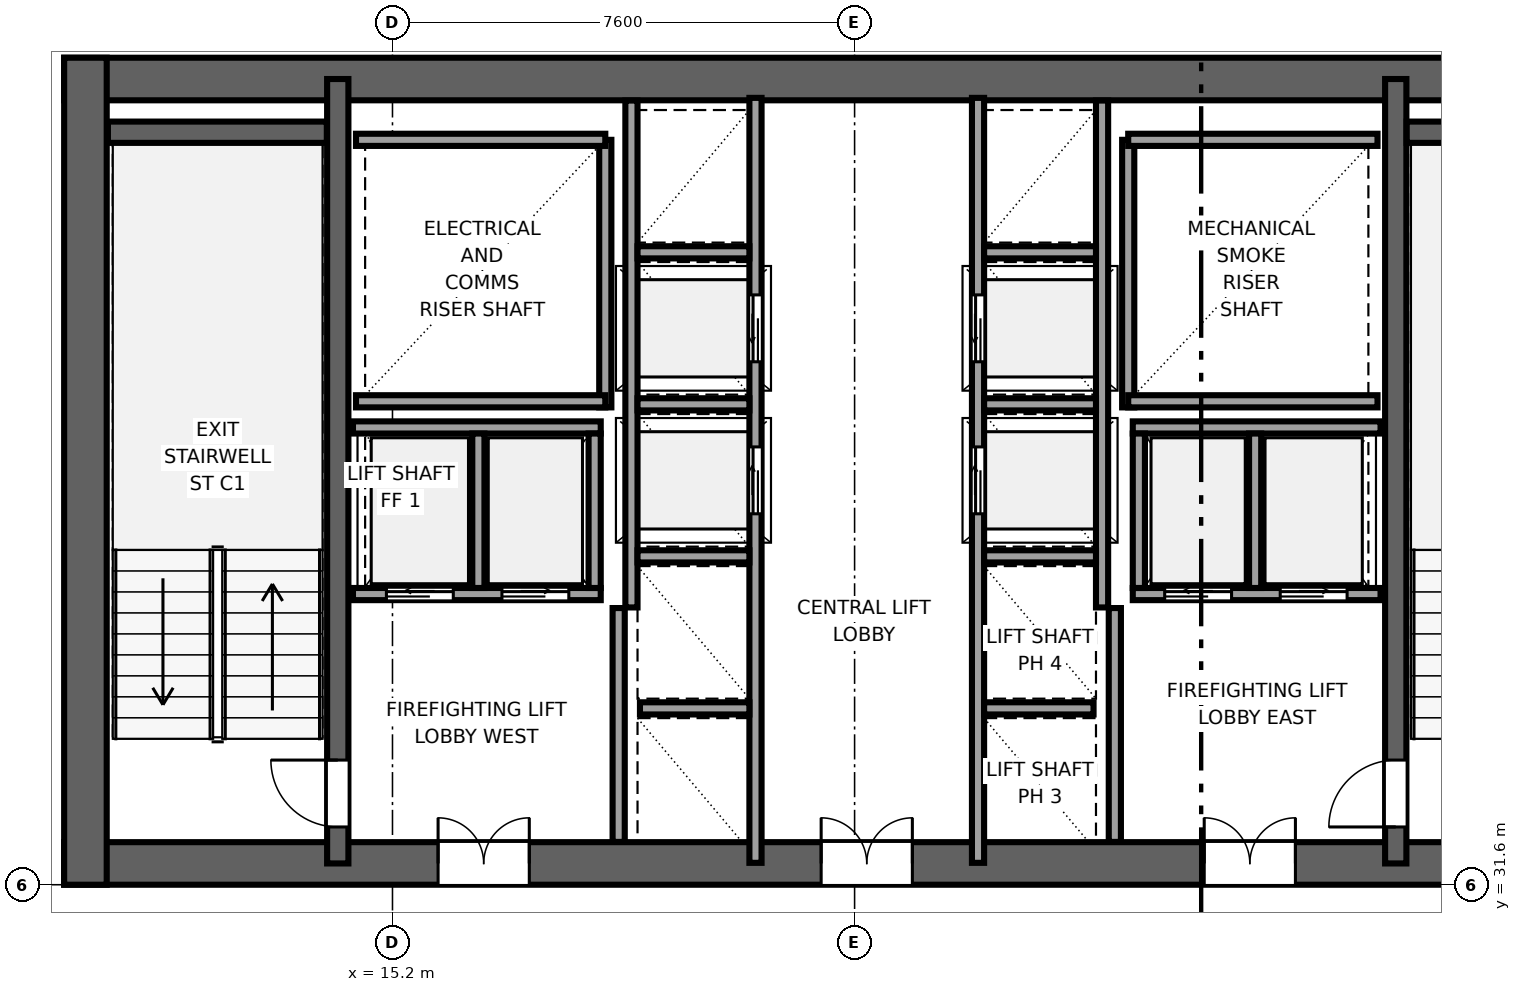
"""IFC4 building model, lengths in metres.
Left out: names, types, materials, properties, quantities, classifications, styles, units other than length and angle.
Written with IfcOpenShell. Run it as: python <this file> out.ifc"""

import sys

from ifc_helpers import new_model, si_unit, direction, frame, frame_2d, origin, place, context, subcontext, project, spatial, rectangle, extrude, source, transform, mapped, element, fill, save


model = new_model("IFC4")
c1 = context("Model", 3, precision=1e-05, world=origin(), true_north=direction((0.0, 1.0)))
c2 = subcontext(c1, "Body", "Model", "MODEL_VIEW")
j1 = project(units=[si_unit("LENGTHUNIT", "METRE"), si_unit("PLANEANGLEUNIT", "RADIAN")], contexts=[c1])
p1 = place(None, origin())
s1 = spatial("IfcSite", under=j1, at=p1, CompositionType="ELEMENT")
p2 = place(p1, origin())
s2 = spatial("IfcBuilding", under=s1, at=p2, CompositionType="ELEMENT")
p3 = place(p2, frame((0.0, 0.0, 129.3)))
s3 = spatial("IfcBuildingStorey", under=s2, at=p3, CompositionType="ELEMENT", Elevation=129.3)
p4 = place(p3, frame((9.8, 31.95, 0.0), z_axis=(0.0, 0.0, 1.0), x_axis=(1.0, 0.0, 0.0)))
e1 = element("IfcWall", 1, at=p4, inside=s3, PredefinedType="SHEAR", context=c2, shape_type="SweptSolid", body=[
    extrude(rectangle(XDim=26.4, YDim=0.7, at=frame_2d((13.2, 0.0))), origin(), (0.0, 0.0, 1.0), 3.55),
])
p5 = place(p4, frame((7.65, 0.0, 0.0), z_axis=(0.0, 0.0, 1.0), x_axis=(-1.0, 0.0, 0.0)))
e2 = element("IfcOpeningElement", 2, at=p5, cuts=e1, PredefinedType="OPENING", context=c2, shape_type="SweptSolid", body=[
    extrude(rectangle(XDim=1.5, YDim=2.04, at=frame_2d((0.75, 1.02))), frame((0.0, 0.36, 0.0), z_axis=(0.0, -1.0, 0.0), x_axis=(1.0, 0.0, 0.0)), (0.0, 0.0, 1.0), 0.72),
])
p6 = place(p4, frame((13.95, 0.0, 0.0), z_axis=(0.0, 0.0, 1.0), x_axis=(-1.0, 0.0, 0.0)))
e3 = element("IfcOpeningElement", 3, at=p6, cuts=e1, PredefinedType="OPENING", context=c2, shape_type="SweptSolid", body=[
    extrude(rectangle(XDim=1.5, YDim=2.04, at=frame_2d((0.75, 1.02))), frame((0.0, 0.36, 0.0), z_axis=(0.0, -1.0, 0.0), x_axis=(1.0, 0.0, 0.0)), (0.0, 0.0, 1.0), 0.72),
])
p7 = place(p4, frame((20.25, 0.0, 0.0), z_axis=(0.0, 0.0, 1.0), x_axis=(-1.0, 0.0, 0.0)))
e4 = element("IfcOpeningElement", 4, at=p7, cuts=e1, PredefinedType="OPENING", context=c2, shape_type="SweptSolid", body=[
    extrude(rectangle(XDim=1.5, YDim=2.04, at=frame_2d((0.75, 1.02))), frame((0.0, 0.36, 0.0), z_axis=(0.0, -1.0, 0.0), x_axis=(1.0, 0.0, 0.0)), (0.0, 0.0, 1.0), 0.72),
])
p8 = place(p3, frame((9.8, 44.85, 0.0), z_axis=(0.0, 0.0, 1.0), x_axis=(1.0, 0.0, 0.0)))
e5 = element("IfcWall", 5, at=p8, inside=s3, PredefinedType="SHEAR", context=c2, shape_type="SweptSolid", body=[
    extrude(rectangle(XDim=26.4, YDim=0.7, at=frame_2d((13.2, 0.0))), origin(), (0.0, 0.0, 1.0), 3.55),
])
p9 = place(p3, frame((10.15, 31.6, 0.0), z_axis=(0.0, 0.0, 1.0), x_axis=(0.0, 1.0, 0.0)))
e6 = element("IfcWall", 6, at=p9, inside=s3, PredefinedType="SHEAR", context=c2, shape_type="SweptSolid", body=[
    extrude(rectangle(XDim=13.6, YDim=0.7, at=frame_2d((6.8, 0.0))), origin(), (0.0, 0.0, 1.0), 3.55),
])
p10 = place(p3, frame((14.3, 31.95, 0.0), z_axis=(0.0, 0.0, 1.0), x_axis=(0.0, 1.0, 0.0)))
e7 = element("IfcWall", 7, at=p10, inside=s3, PredefinedType="SHEAR", context=c2, shape_type="SweptSolid", body=[
    extrude(rectangle(XDim=12.9, YDim=0.35, at=frame_2d((6.45, 0.0))), origin(), (0.0, 0.0, 1.0), 3.55),
])
p11 = place(p10, frame((0.6, 0.0, 0.0)))
e8 = element("IfcOpeningElement", 8, at=p11, cuts=e7, PredefinedType="OPENING", context=c2, shape_type="SweptSolid", body=[
    extrude(rectangle(XDim=1.1, YDim=2.12, at=frame_2d((0.55, 1.06))), frame((0.0, 0.185, 0.0), z_axis=(0.0, -1.0, 0.0), x_axis=(1.0, 0.0, 0.0)), (0.0, 0.0, 1.0), 0.37),
])
p12 = place(p3, frame((31.7, 31.95, 0.0), z_axis=(0.0, 0.0, 1.0), x_axis=(0.0, 1.0, 0.0)))
e9 = element("IfcWall", 9, at=p12, inside=s3, PredefinedType="SHEAR", context=c2, shape_type="SweptSolid", body=[
    extrude(rectangle(XDim=12.9, YDim=0.35, at=frame_2d((6.45, 0.0))), origin(), (0.0, 0.0, 1.0), 3.55),
])
p13 = place(p12, frame((1.7, 0.0, 0.0), z_axis=(0.0, 0.0, 1.0), x_axis=(-1.0, 0.0, 0.0)))
e10 = element("IfcOpeningElement", 10, at=p13, cuts=e9, PredefinedType="OPENING", context=c2, shape_type="SweptSolid", body=[
    extrude(rectangle(XDim=1.1, YDim=2.12, at=frame_2d((0.55, 1.06))), frame((0.0, 0.185, 0.0), z_axis=(0.0, -1.0, 0.0), x_axis=(1.0, 0.0, 0.0)), (0.0, 0.0, 1.0), 0.37),
])
for number, where, z_axis, x_axis in (
    (11, (10.52, 43.975, 0.0), (0.0, 0.0, 1.0), (1.0, 0.0, 0.0)),
    (12, (31.88, 43.975, 0.0), (0.0, 0.0, 1.0), (1.0, 0.0, 0.0)),
):
    element("IfcWall", number, at=place(p3, frame(where, z_axis=z_axis, x_axis=x_axis)), inside=s3, PredefinedType="SHEAR", context=c2, shape_type="SweptSolid", body=[
        extrude(rectangle(XDim=3.6, YDim=0.35, at=frame_2d((1.8, 0.0))), origin(), (0.0, 0.0, 1.0), 3.55),
    ])
p14 = place(p3, frame((18.7, 39.45, 0.0), z_axis=(0.0, 0.0, 1.0), x_axis=(0.0, 1.0, 0.0)))
e13 = element("IfcWall", 13, at=p14, inside=s3, PredefinedType="SOLIDWALL", context=c2, shape_type="SweptSolid", body=[
    extrude(rectangle(XDim=4.4, YDim=0.2, at=frame_2d((2.2, 0.0))), origin(), (0.0, 0.0, 1.0), 3.37),
])
for number, where, z_axis, x_axis in (
    (14, (14.6, 39.55, 0.0), (0.0, 0.0, 1.0), (1.0, 0.0, 0.0)),
    (15, (14.6, 43.85, 0.0), (0.0, 0.0, 1.0), (1.0, 0.0, 0.0)),
):
    element("IfcWall", number, at=place(p3, frame(where, z_axis=z_axis, x_axis=x_axis)), inside=s3, PredefinedType="SOLIDWALL", context=c2, shape_type="SweptSolid", body=[
        extrude(rectangle(XDim=4.1, YDim=0.2, at=frame_2d((2.05, 0.0))), origin(), (0.0, 0.0, 1.0), 3.37),
    ])
p15 = place(p3, frame((27.3, 39.45, 0.0), z_axis=(0.0, 0.0, 1.0), x_axis=(0.0, 1.0, 0.0)))
e16 = element("IfcWall", 16, at=p15, inside=s3, PredefinedType="SOLIDWALL", context=c2, shape_type="SweptSolid", body=[
    extrude(rectangle(XDim=4.4, YDim=0.2, at=frame_2d((2.2, 0.0))), origin(), (0.0, 0.0, 1.0), 3.37),
])
for number, where, z_axis, x_axis in (
    (17, (27.3, 39.55, 0.0), (0.0, 0.0, 1.0), (1.0, 0.0, 0.0)),
    (18, (27.3, 43.85, 0.0), (0.0, 0.0, 1.0), (1.0, 0.0, 0.0)),
):
    element("IfcWall", number, at=place(p3, frame(where, z_axis=z_axis, x_axis=x_axis)), inside=s3, PredefinedType="SOLIDWALL", context=c2, shape_type="SweptSolid", body=[
        extrude(rectangle(XDim=4.1, YDim=0.2, at=frame_2d((2.05, 0.0))), origin(), (0.0, 0.0, 1.0), 3.37),
    ])
for number, where, z_axis, x_axis in (
    (19, (18.92, 32.304, 0.0), (0.0, 0.0, 1.0), (0.0, 1.0, 0.0)),
    (20, (27.08, 32.304, 0.0), (0.0, 0.0, 1.0), (0.0, 1.0, 0.0)),
):
    element("IfcWall", number, at=place(p3, frame(where, z_axis=z_axis, x_axis=x_axis)), inside=s3, PredefinedType="SOLIDWALL", context=c2, shape_type="SweptSolid", body=[
        extrude(rectangle(XDim=3.846, YDim=0.2, at=frame_2d((1.923, 0.0))), origin(), (0.0, 0.0, 1.0), 3.37),
    ])
p16 = place(p3, frame((21.17, 31.96, 0.0), z_axis=(0.0, 0.0, 1.0), x_axis=(0.0, 1.0, 0.0)))
e21 = element("IfcWall", 21, at=p16, inside=s3, PredefinedType="SOLIDWALL", context=c2, shape_type="SweptSolid", body=[
    extrude(rectangle(XDim=12.58, YDim=0.2, at=frame_2d((6.29, 0.0))), origin(), (0.0, 0.0, 1.0), 3.37),
])
p17 = place(p16, frame((5.74, 0.0, 0.0)))
e22 = element("IfcOpeningElement", 22, at=p17, cuts=e21, PredefinedType="OPENING", context=c2, shape_type="SweptSolid", body=[
    extrude(rectangle(XDim=1.1, YDim=2.12, at=frame_2d((0.55, 1.06))), frame((0.0, 0.11, 0.0), z_axis=(0.0, -1.0, 0.0), x_axis=(1.0, 0.0, 0.0)), (0.0, 0.0, 1.0), 0.22),
])
p18 = place(p16, frame((8.24, 0.0, 0.0)))
e23 = element("IfcOpeningElement", 23, at=p18, cuts=e21, PredefinedType="OPENING", context=c2, shape_type="SweptSolid", body=[
    extrude(rectangle(XDim=1.1, YDim=2.12, at=frame_2d((0.55, 1.06))), frame((0.0, 0.11, 0.0), z_axis=(0.0, -1.0, 0.0), x_axis=(1.0, 0.0, 0.0)), (0.0, 0.0, 1.0), 0.22),
])
p19 = place(p3, frame((19.13, 36.16, 0.0), z_axis=(0.0, 0.0, 1.0), x_axis=(0.0, 1.0, 0.0)))
e24 = element("IfcWall", 24, at=p19, inside=s3, PredefinedType="SOLIDWALL", context=c2, shape_type="SweptSolid", body=[
    extrude(rectangle(XDim=8.336, YDim=0.2, at=frame_2d((4.168, 0.0))), origin(), (0.0, 0.0, 1.0), 3.37),
])
p20 = place(p3, frame((19.27, 34.5, 0.0), z_axis=(0.0, 0.0, 1.0), x_axis=(1.0, 0.0, 0.0)))
e25 = element("IfcWall", 25, at=p20, inside=s3, PredefinedType="SOLIDWALL", context=c2, shape_type="SweptSolid", body=[
    extrude(rectangle(XDim=1.8, YDim=0.2, at=frame_2d((0.9, 0.0))), origin(), (0.0, 0.0, 1.0), 3.37),
])
for number, where, z_axis, x_axis in (
    (26, (19.23, 37.0, 0.0), (0.0, 0.0, 1.0), (1.0, 0.0, 0.0)),
    (27, (19.23, 39.5, 0.0), (0.0, 0.0, 1.0), (1.0, 0.0, 0.0)),
    (28, (19.23, 42.0, 0.0), (0.0, 0.0, 1.0), (1.0, 0.0, 0.0)),
):
    element("IfcWall", number, at=place(p3, frame(where, z_axis=z_axis, x_axis=x_axis)), inside=s3, PredefinedType="SOLIDWALL", context=c2, shape_type="SweptSolid", body=[
        extrude(rectangle(XDim=1.84, YDim=0.2, at=frame_2d((0.92, 0.0))), origin(), (0.0, 0.0, 1.0), 3.37),
    ])
p21 = place(p3, frame((27.375, 36.38, 0.0), z_axis=(0.0, 0.0, 1.0), x_axis=(1.0, 0.0, 0.0)))
e29 = element("IfcWall", 29, at=p21, inside=s3, PredefinedType="SOLIDWALL", context=c2, shape_type="SweptSolid", body=[
    extrude(rectangle(XDim=4.075, YDim=0.2, at=frame_2d((2.038, 0.0))), origin(), (0.0, 0.0, 1.0), 3.37),
])
p22 = place(p21, frame((0.525, 0.0, 0.0)))
e30 = element("IfcOpeningElement", 30, at=p22, cuts=e29, PredefinedType="OPENING", context=c2, shape_type="SweptSolid", body=[
    extrude(rectangle(XDim=1.1, YDim=2.12, at=frame_2d((0.55, 1.06))), frame((0.0, 0.11, 0.0), z_axis=(0.0, -1.0, 0.0), x_axis=(1.0, 0.0, 0.0)), (0.0, 0.0, 1.0), 0.22),
])
p23 = place(p21, frame((2.425, 0.0, 0.0)))
e31 = element("IfcOpeningElement", 31, at=p23, cuts=e29, PredefinedType="OPENING", context=c2, shape_type="SweptSolid", body=[
    extrude(rectangle(XDim=1.1, YDim=2.12, at=frame_2d((0.55, 1.06))), frame((0.0, 0.11, 0.0), z_axis=(0.0, -1.0, 0.0), x_axis=(1.0, 0.0, 0.0)), (0.0, 0.0, 1.0), 0.22),
])
p24 = place(p3, frame((27.375, 39.12, 0.0), z_axis=(0.0, 0.0, 1.0), x_axis=(1.0, 0.0, 0.0)))
e32 = element("IfcWall", 32, at=p24, inside=s3, PredefinedType="SOLIDWALL", context=c2, shape_type="SweptSolid", body=[
    extrude(rectangle(XDim=4.075, YDim=0.2, at=frame_2d((2.038, 0.0))), origin(), (0.0, 0.0, 1.0), 3.37),
])
for number, where, z_axis, x_axis in (
    (33, (27.475, 36.48, 0.0), (0.0, 0.0, 1.0), (0.0, 1.0, 0.0)),
    (34, (29.387, 36.48, 0.0), (0.0, 0.0, 1.0), (0.0, 1.0, 0.0)),
):
    element("IfcWall", number, at=place(p3, frame(where, z_axis=z_axis, x_axis=x_axis)), inside=s3, PredefinedType="SOLIDWALL", context=c2, shape_type="SweptSolid", body=[
        extrude(rectangle(XDim=2.54, YDim=0.2, at=frame_2d((1.27, 0.0))), origin(), (0.0, 0.0, 1.0), 3.37),
    ])
p25 = place(p3, frame((14.55, 36.38, 0.0), z_axis=(0.0, 0.0, 1.0), x_axis=(1.0, 0.0, 0.0)))
e35 = element("IfcWall", 35, at=p25, inside=s3, PredefinedType="SOLIDWALL", context=c2, shape_type="SweptSolid", body=[
    extrude(rectangle(XDim=4.075, YDim=0.2, at=frame_2d((2.038, 0.0))), origin(), (0.0, 0.0, 1.0), 3.37),
])
p26 = place(p25, frame((0.55, 0.0, 0.0)))
e36 = element("IfcOpeningElement", 36, at=p26, cuts=e35, PredefinedType="OPENING", context=c2, shape_type="SweptSolid", body=[
    extrude(rectangle(XDim=1.1, YDim=2.12, at=frame_2d((0.55, 1.06))), frame((0.0, 0.11, 0.0), z_axis=(0.0, -1.0, 0.0), x_axis=(1.0, 0.0, 0.0)), (0.0, 0.0, 1.0), 0.22),
])
p27 = place(p25, frame((2.45, 0.0, 0.0)))
e37 = element("IfcOpeningElement", 37, at=p27, cuts=e35, PredefinedType="OPENING", context=c2, shape_type="SweptSolid", body=[
    extrude(rectangle(XDim=1.1, YDim=2.12, at=frame_2d((0.55, 1.06))), frame((0.0, 0.11, 0.0), z_axis=(0.0, -1.0, 0.0), x_axis=(1.0, 0.0, 0.0)), (0.0, 0.0, 1.0), 0.22),
])
p28 = place(p3, frame((14.55, 39.12, 0.0), z_axis=(0.0, 0.0, 1.0), x_axis=(1.0, 0.0, 0.0)))
e38 = element("IfcWall", 38, at=p28, inside=s3, PredefinedType="SOLIDWALL", context=c2, shape_type="SweptSolid", body=[
    extrude(rectangle(XDim=4.075, YDim=0.2, at=frame_2d((2.038, 0.0))), origin(), (0.0, 0.0, 1.0), 3.37),
])
for number, where, z_axis, x_axis in (
    (39, (18.525, 36.48, 0.0), (0.0, 0.0, 1.0), (0.0, 1.0, 0.0)),
    (40, (16.613, 36.48, 0.0), (0.0, 0.0, 1.0), (0.0, 1.0, 0.0)),
):
    element("IfcWall", number, at=place(p3, frame(where, z_axis=z_axis, x_axis=x_axis)), inside=s3, PredefinedType="SOLIDWALL", context=c2, shape_type="SweptSolid", body=[
        extrude(rectangle(XDim=2.54, YDim=0.2, at=frame_2d((1.27, 0.0))), origin(), (0.0, 0.0, 1.0), 3.37),
    ])
p29 = place(p3, frame((24.83, 31.96, 0.0), z_axis=(0.0, 0.0, 1.0), x_axis=(0.0, 1.0, 0.0)))
e41 = element("IfcWall", 41, at=p29, inside=s3, PredefinedType="SOLIDWALL", context=c2, shape_type="SweptSolid", body=[
    extrude(rectangle(XDim=12.58, YDim=0.2, at=frame_2d((6.29, 0.0))), origin(), (0.0, 0.0, 1.0), 3.37),
])
p30 = place(p29, frame((5.74, 0.0, 0.0)))
e42 = element("IfcOpeningElement", 42, at=p30, cuts=e41, PredefinedType="OPENING", context=c2, shape_type="SweptSolid", body=[
    extrude(rectangle(XDim=1.1, YDim=2.12, at=frame_2d((0.55, 1.06))), frame((0.0, 0.11, 0.0), z_axis=(0.0, -1.0, 0.0), x_axis=(1.0, 0.0, 0.0)), (0.0, 0.0, 1.0), 0.22),
])
p31 = place(p29, frame((8.24, 0.0, 0.0)))
e43 = element("IfcOpeningElement", 43, at=p31, cuts=e41, PredefinedType="OPENING", context=c2, shape_type="SweptSolid", body=[
    extrude(rectangle(XDim=1.1, YDim=2.12, at=frame_2d((0.55, 1.06))), frame((0.0, 0.11, 0.0), z_axis=(0.0, -1.0, 0.0), x_axis=(1.0, 0.0, 0.0)), (0.0, 0.0, 1.0), 0.22),
])
p32 = place(p3, frame((26.87, 36.16, 0.0), z_axis=(0.0, 0.0, 1.0), x_axis=(0.0, 1.0, 0.0)))
e44 = element("IfcWall", 44, at=p32, inside=s3, PredefinedType="SOLIDWALL", context=c2, shape_type="SweptSolid", body=[
    extrude(rectangle(XDim=8.336, YDim=0.2, at=frame_2d((4.168, 0.0))), origin(), (0.0, 0.0, 1.0), 3.37),
])
p33 = place(p3, frame((24.93, 34.5, 0.0), z_axis=(0.0, 0.0, 1.0), x_axis=(1.0, 0.0, 0.0)))
e45 = element("IfcWall", 45, at=p33, inside=s3, PredefinedType="SOLIDWALL", context=c2, shape_type="SweptSolid", body=[
    extrude(rectangle(XDim=1.8, YDim=0.2, at=frame_2d((0.9, 0.0))), origin(), (0.0, 0.0, 1.0), 3.37),
])
for number, where, z_axis, x_axis in (
    (46, (24.93, 37.0, 0.0), (0.0, 0.0, 1.0), (1.0, 0.0, 0.0)),
    (47, (24.93, 39.5, 0.0), (0.0, 0.0, 1.0), (1.0, 0.0, 0.0)),
    (48, (24.93, 42.0, 0.0), (0.0, 0.0, 1.0), (1.0, 0.0, 0.0)),
):
    element("IfcWall", number, at=place(p3, frame(where, z_axis=z_axis, x_axis=x_axis)), inside=s3, PredefinedType="SOLIDWALL", context=c2, shape_type="SweptSolid", body=[
        extrude(rectangle(XDim=1.84, YDim=0.2, at=frame_2d((0.92, 0.0))), origin(), (0.0, 0.0, 1.0), 3.37),
    ])
m1 = source(origin(), c2, "Body", "SweptSolid", [
    extrude(rectangle(XDim=1.1, YDim=2.12, at=frame_2d((0.55, 1.06))), frame((0.0, 0.025, 0.0), z_axis=(0.0, -1.0, 0.0), x_axis=(1.0, 0.0, 0.0)), (0.0, 0.0, 1.0), 0.05),
])
p34 = place(p11, origin())
e49 = element("IfcDoor", 49, at=p34, inside=s3, OperationType="SINGLE_SWING_RIGHT", PredefinedType="DOOR", context=c2, shape_type="MappedRepresentation", body=[
    mapped(m1, transform((0.0, 0.0, 0.0), x_axis=(1.0, 0.0, 0.0), y_axis=(0.0, 1.0, 0.0), z_axis=(0.0, 0.0, 1.0), scale=1.0)),
])
fill(e8, e49)
p35 = place(p13, origin())
e50 = element("IfcDoor", 50, at=p35, inside=s3, OperationType="SINGLE_SWING_LEFT", PredefinedType="DOOR", context=c2, shape_type="MappedRepresentation", body=[
    mapped(m1, transform((0.0, 0.0, 0.0), x_axis=(1.0, 0.0, 0.0), y_axis=(0.0, 1.0, 0.0), z_axis=(0.0, 0.0, 1.0), scale=1.0)),
])
fill(e10, e50)
m2 = source(origin(), c2, "Body", "SweptSolid", [
    extrude(rectangle(XDim=1.5, YDim=2.04, at=frame_2d((0.75, 1.02))), frame((0.0, 0.025, 0.0), z_axis=(0.0, -1.0, 0.0), x_axis=(1.0, 0.0, 0.0)), (0.0, 0.0, 1.0), 0.05),
])
p36 = place(p5, origin())
e51 = element("IfcDoor", 51, at=p36, inside=s3, OperationType="DOUBLE_DOOR_SINGLE_SWING", PredefinedType="DOOR", context=c2, shape_type="MappedRepresentation", body=[
    mapped(m2, transform((0.0, 0.0, 0.0), x_axis=(1.0, 0.0, 0.0), y_axis=(0.0, 1.0, 0.0), z_axis=(0.0, 0.0, 1.0), scale=1.0)),
])
fill(e2, e51)
p37 = place(p6, origin())
e52 = element("IfcDoor", 52, at=p37, inside=s3, OperationType="DOUBLE_DOOR_SINGLE_SWING", PredefinedType="DOOR", context=c2, shape_type="MappedRepresentation", body=[
    mapped(m2, transform((0.0, 0.0, 0.0), x_axis=(1.0, 0.0, 0.0), y_axis=(0.0, 1.0, 0.0), z_axis=(0.0, 0.0, 1.0), scale=1.0)),
])
fill(e3, e52)
p38 = place(p7, origin())
e53 = element("IfcDoor", 53, at=p38, inside=s3, OperationType="DOUBLE_DOOR_SINGLE_SWING", PredefinedType="DOOR", context=c2, shape_type="MappedRepresentation", body=[
    mapped(m2, transform((0.0, 0.0, 0.0), x_axis=(1.0, 0.0, 0.0), y_axis=(0.0, 1.0, 0.0), z_axis=(0.0, 0.0, 1.0), scale=1.0)),
])
fill(e4, e53)
m3 = source(origin(), c2, "Body", "SweptSolid", [
    extrude(rectangle(XDim=1.1, YDim=2.12, at=frame_2d((0.55, 1.06))), frame((0.0, 0.025, 0.0), z_axis=(0.0, -1.0, 0.0), x_axis=(1.0, 0.0, 0.0)), (0.0, 0.0, 1.0), 0.05),
])
p39 = place(p17, origin())
e54 = element("IfcDoor", 54, at=p39, inside=s3, OperationType="SLIDING_TO_RIGHT", PredefinedType="DOOR", context=c2, shape_type="MappedRepresentation", body=[
    mapped(m3, transform((0.0, 0.0, 0.0), x_axis=(1.0, 0.0, 0.0), y_axis=(0.0, 1.0, 0.0), z_axis=(0.0, 0.0, 1.0), scale=1.0)),
])
fill(e22, e54)
p40 = place(p18, origin())
e55 = element("IfcDoor", 55, at=p40, inside=s3, OperationType="SLIDING_TO_LEFT", PredefinedType="DOOR", context=c2, shape_type="MappedRepresentation", body=[
    mapped(m3, transform((0.0, 0.0, 0.0), x_axis=(1.0, 0.0, 0.0), y_axis=(0.0, 1.0, 0.0), z_axis=(0.0, 0.0, 1.0), scale=1.0)),
])
fill(e23, e55)
p41 = place(p22, origin())
e56 = element("IfcDoor", 56, at=p41, inside=s3, OperationType="SLIDING_TO_LEFT", PredefinedType="DOOR", context=c2, shape_type="MappedRepresentation", body=[
    mapped(m3, transform((0.0, 0.0, 0.0), x_axis=(1.0, 0.0, 0.0), y_axis=(0.0, 1.0, 0.0), z_axis=(0.0, 0.0, 1.0), scale=1.0)),
])
fill(e30, e56)
p42 = place(p23, origin())
e57 = element("IfcDoor", 57, at=p42, inside=s3, OperationType="SLIDING_TO_RIGHT", PredefinedType="DOOR", context=c2, shape_type="MappedRepresentation", body=[
    mapped(m3, transform((0.0, 0.0, 0.0), x_axis=(1.0, 0.0, 0.0), y_axis=(0.0, 1.0, 0.0), z_axis=(0.0, 0.0, 1.0), scale=1.0)),
])
fill(e31, e57)
p43 = place(p26, origin())
e58 = element("IfcDoor", 58, at=p43, inside=s3, OperationType="SLIDING_TO_LEFT", PredefinedType="DOOR", context=c2, shape_type="MappedRepresentation", body=[
    mapped(m3, transform((0.0, 0.0, 0.0), x_axis=(1.0, 0.0, 0.0), y_axis=(0.0, 1.0, 0.0), z_axis=(0.0, 0.0, 1.0), scale=1.0)),
])
fill(e36, e58)
p44 = place(p27, origin())
e59 = element("IfcDoor", 59, at=p44, inside=s3, OperationType="SLIDING_TO_RIGHT", PredefinedType="DOOR", context=c2, shape_type="MappedRepresentation", body=[
    mapped(m3, transform((0.0, 0.0, 0.0), x_axis=(1.0, 0.0, 0.0), y_axis=(0.0, 1.0, 0.0), z_axis=(0.0, 0.0, 1.0), scale=1.0)),
])
fill(e37, e59)
p45 = place(p30, origin())
e60 = element("IfcDoor", 60, at=p45, inside=s3, OperationType="SLIDING_TO_RIGHT", PredefinedType="DOOR", context=c2, shape_type="MappedRepresentation", body=[
    mapped(m3, transform((0.0, 0.0, 0.0), x_axis=(1.0, 0.0, 0.0), y_axis=(0.0, 1.0, 0.0), z_axis=(0.0, 0.0, 1.0), scale=1.0)),
])
fill(e42, e60)
p46 = place(p31, origin())
e61 = element("IfcDoor", 61, at=p46, inside=s3, OperationType="SLIDING_TO_LEFT", PredefinedType="DOOR", context=c2, shape_type="MappedRepresentation", body=[
    mapped(m3, transform((0.0, 0.0, 0.0), x_axis=(1.0, 0.0, 0.0), y_axis=(0.0, 1.0, 0.0), z_axis=(0.0, 0.0, 1.0), scale=1.0)),
])
fill(e43, e61)
save(model, sys.argv[1])
